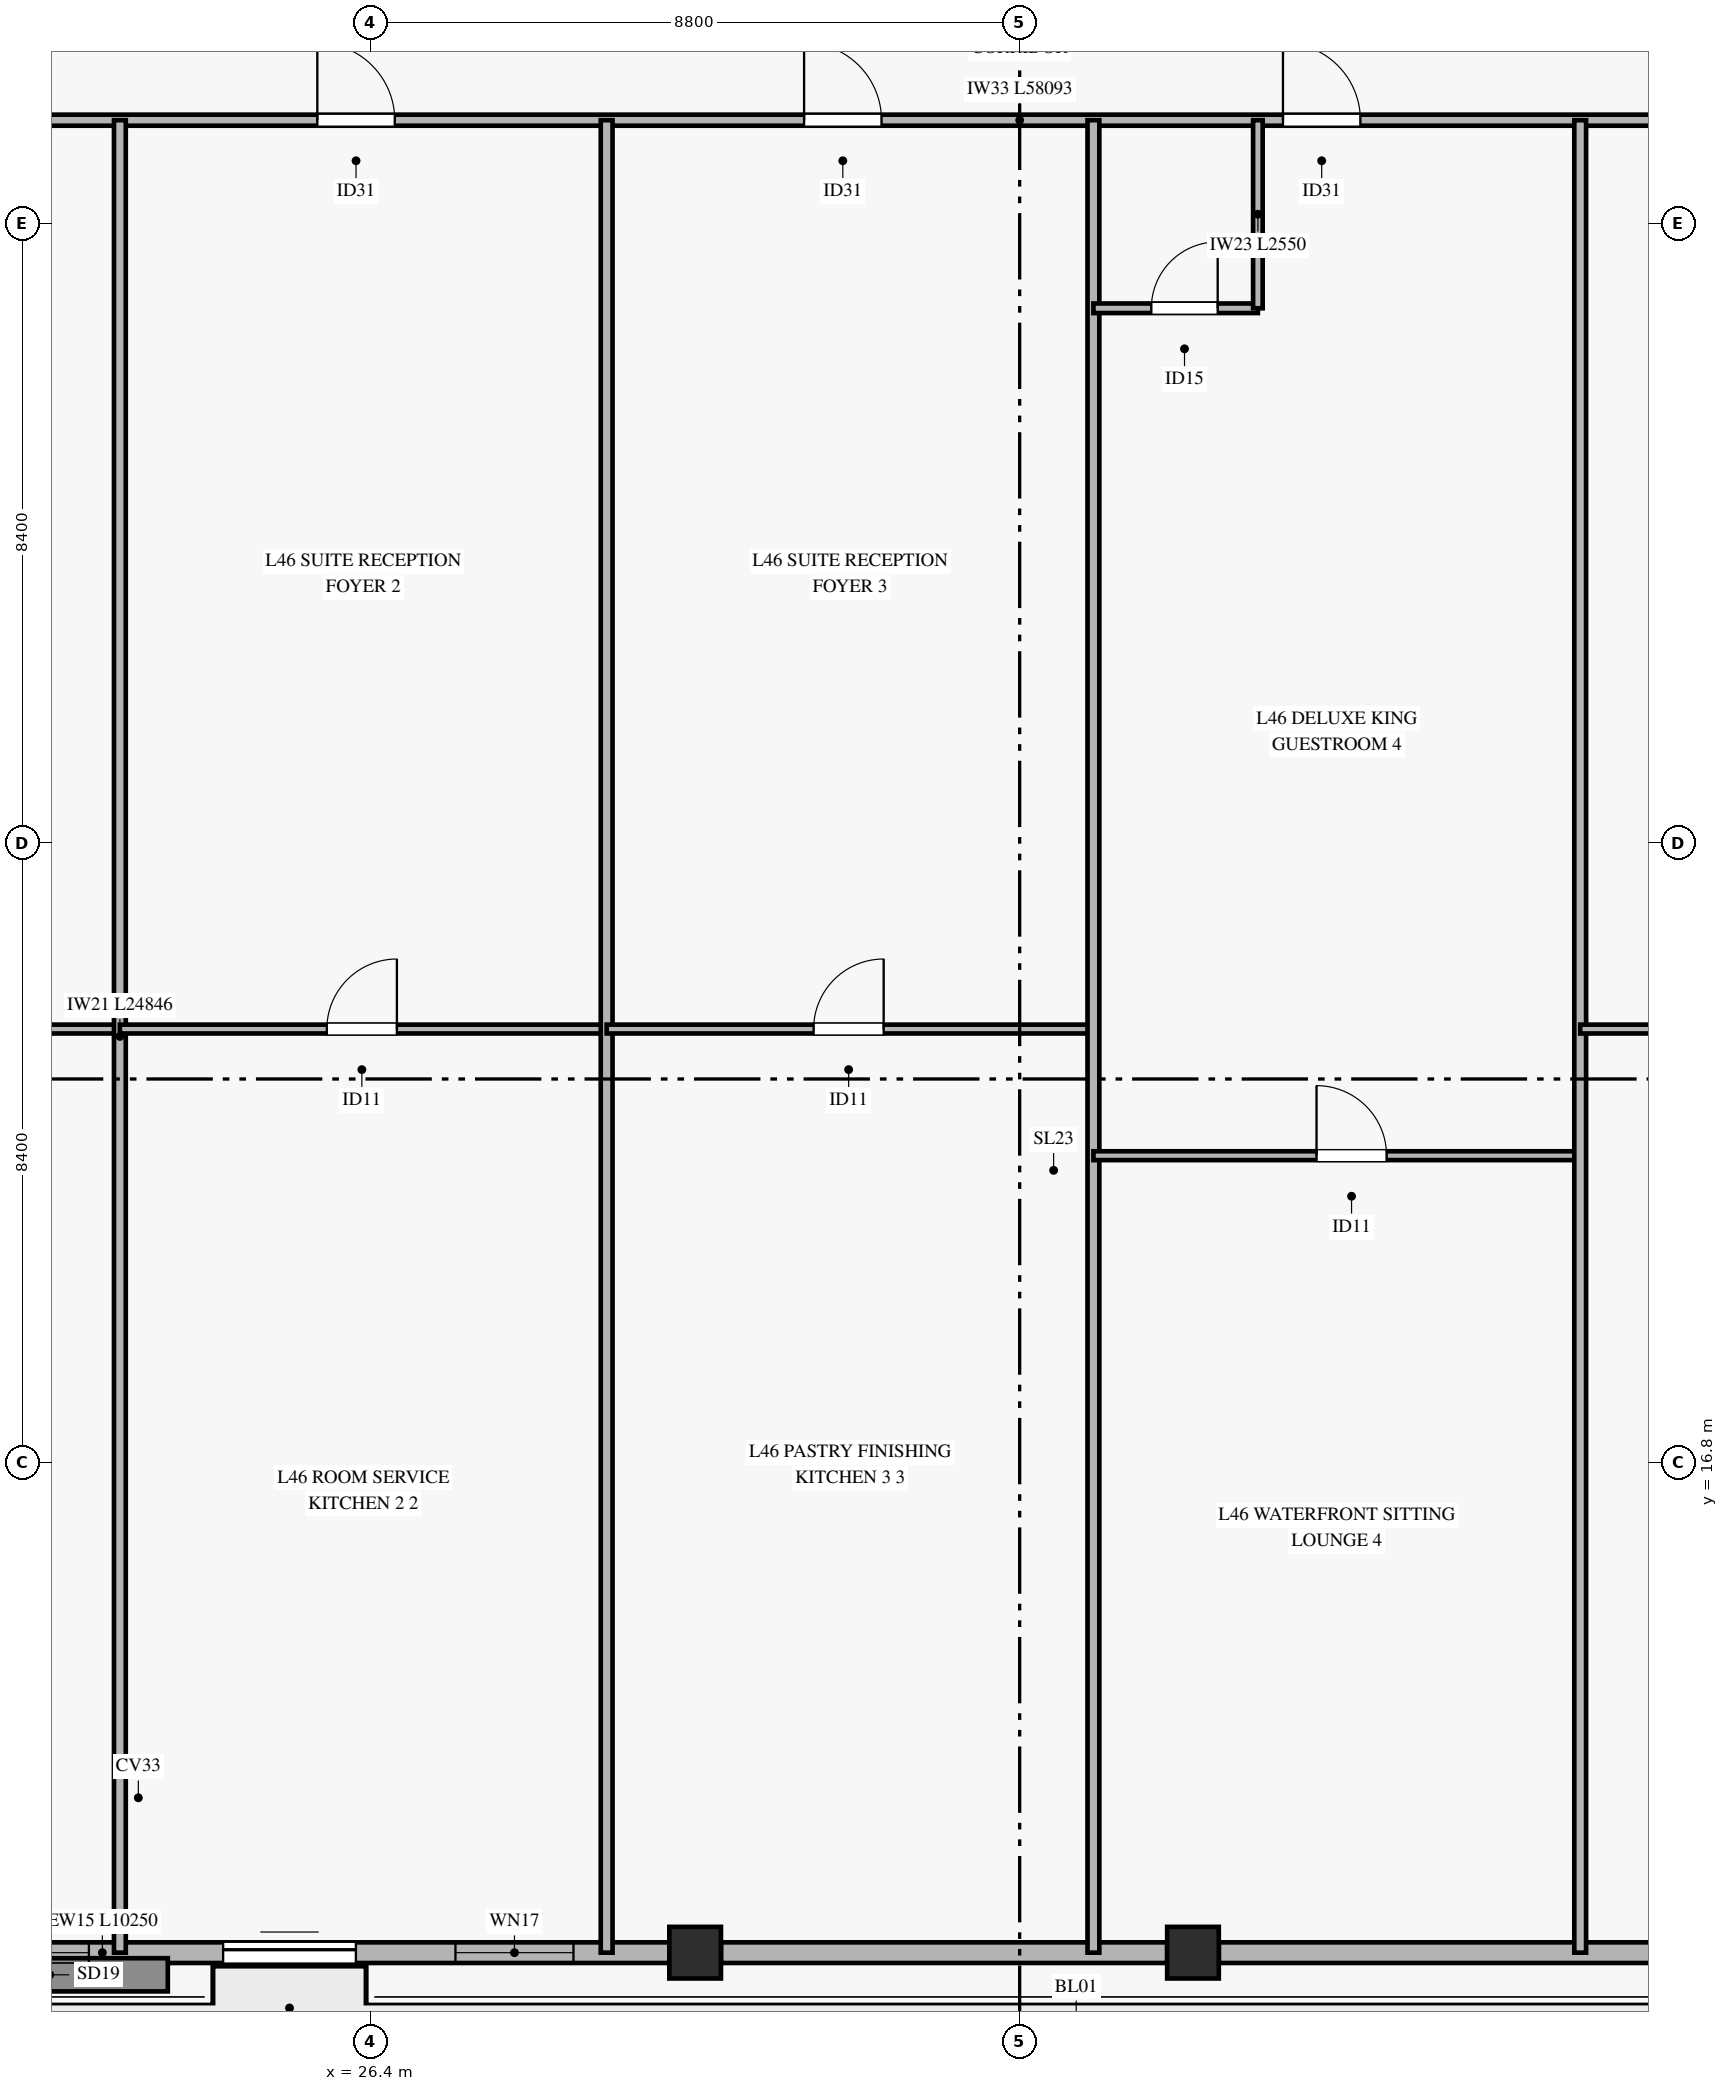
"""IFC4 building model, lengths in metres.
Left out: names, types, materials, properties, quantities, classifications, styles, units other than length and angle.
Written with IfcOpenShell. Run it as: python <this file> out.ifc"""

import sys

from ifc_helpers import new_model, si_unit, direction, frame, frame_2d, origin, origin_2d, place, context, subcontext, project, spatial, rectangle, hollow_rectangle, extrude, source, transform, mapped, element, fill, save


model = new_model("IFC4")
c1 = context("Model", 3, precision=1e-05, world=origin(), true_north=direction((0.0, 1.0)))
c2 = subcontext(c1, "Body", "Model", "MODEL_VIEW")
j1 = project(units=[si_unit("LENGTHUNIT", "METRE"), si_unit("PLANEANGLEUNIT", "RADIAN")], contexts=[c1])
p1 = place(None, origin())
s1 = spatial("IfcSite", under=j1, at=p1, CompositionType="ELEMENT")
p2 = place(p1, origin())
s2 = spatial("IfcBuilding", under=s1, at=p2, CompositionType="ELEMENT")
p3 = place(p2, frame((0.0, 0.0, 184.2)))
s3 = spatial("IfcBuildingStorey", under=s2, at=p3, CompositionType="ELEMENT", Elevation=184.2)
m1 = source(origin(), c2, "Body", "SweptSolid", [
    extrude(hollow_rectangle(XDim=0.7, YDim=0.7, WallThickness=0.032, at=origin_2d()), origin(), (0.0, 0.0, 1.0), 3.27),
])
for number, where, z_axis, x_axis in (
    (1, (30.8, 10.154, 0.0), (0.0, 0.0, 1.0), (1.0, 0.0, 0.0)),
    (2, (37.55, 10.154, 0.0), (0.0, 0.0, 1.0), (1.0, 0.0, 0.0)),
):
    element("IfcColumn", number, at=place(p3, frame(where, z_axis=z_axis, x_axis=x_axis)), inside=s3, PredefinedType="COLUMN", context=c2, shape_type="MappedRepresentation", body=[
        mapped(m1, transform((0.0, 0.0, 0.0), x_axis=(1.0, 0.0, 0.0), y_axis=(0.0, 1.0, 0.0), z_axis=(0.0, 0.0, 1.0), scale=1.0)),
    ])
p4 = place(p3, frame((20.2, 10.154, 0.0), z_axis=(0.0, 0.0, 1.0), x_axis=(1.0, 0.0, 0.0)))
e3 = element("IfcWall", 3, at=p4, inside=s3, PredefinedType="SOLIDWALL", context=c2, shape_type="SweptSolid", body=[
    extrude(rectangle(XDim=10.25, YDim=0.28, at=frame_2d((5.125, 0.0))), origin(), (0.0, 0.0, 1.0), 2.75),
])
p5 = place(p4, frame((4.2, 0.0, 0.0)))
e4 = element("IfcOpeningElement", 4, at=p5, cuts=e3, PredefinedType="OPENING", context=c2, shape_type="SweptSolid", body=[
    extrude(rectangle(XDim=1.8, YDim=2.25, at=frame_2d((0.9, 1.125))), frame((0.0, 0.15, 0.0), z_axis=(0.0, -1.0, 0.0), x_axis=(1.0, 0.0, 0.0)), (0.0, 0.0, 1.0), 0.3),
])
p6 = place(p4, frame((0.38, 0.0, 0.45)))
e5 = element("IfcOpeningElement", 5, at=p6, cuts=e3, PredefinedType="OPENING", context=c2, shape_type="SweptSolid", body=[
    extrude(rectangle(XDim=2.0, YDim=2.0, at=frame_2d((1.0, 1.0))), frame((0.0, 0.15, 0.0), z_axis=(0.0, -1.0, 0.0), x_axis=(1.0, 0.0, 0.0)), (0.0, 0.0, 1.0), 0.3),
])
p7 = place(p4, frame((7.35, 0.0, 0.45)))
e6 = element("IfcOpeningElement", 6, at=p7, cuts=e3, PredefinedType="OPENING", context=c2, shape_type="SweptSolid", body=[
    extrude(rectangle(XDim=1.6, YDim=2.0, at=frame_2d((0.8, 1.0))), frame((0.0, 0.15, 0.0), z_axis=(0.0, -1.0, 0.0), x_axis=(1.0, 0.0, 0.0)), (0.0, 0.0, 1.0), 0.3),
])
for number, where, z_axis, x_axis in (
    (7, (31.15, 10.154, 0.0), (0.0, 0.0, 1.0), (1.0, 0.0, 0.0)),
    (8, (37.9, 10.154, 0.0), (0.0, 0.0, 1.0), (1.0, 0.0, 0.0)),
):
    element("IfcWall", number, at=place(p3, frame(where, z_axis=z_axis, x_axis=x_axis)), inside=s3, PredefinedType="SOLIDWALL", context=c2, shape_type="SweptSolid", body=[
        extrude(rectangle(XDim=6.05, YDim=0.28, at=frame_2d((3.025, 0.0))), origin(), (0.0, 0.0, 1.0), 2.75),
    ])
p8 = place(p3, frame((6.154, 35.0, 0.0), z_axis=(0.0, 0.0, 1.0), x_axis=(1.0, 0.0, 0.0)))
e9 = element("IfcWall", 9, at=p8, inside=s3, PredefinedType="PARTITIONING", context=c2, shape_type="SweptSolid", body=[
    extrude(rectangle(XDim=58.093, YDim=0.15, at=frame_2d((29.046, 0.0))), origin(), (0.0, 0.0, 1.0), 2.455),
])
p9 = place(p8, frame((6.695, 0.0, 0.0)))
e10 = element("IfcOpeningElement", 10, at=p9, cuts=e9, PredefinedType="OPENING", context=c2, shape_type="SweptSolid", body=[
    extrude(rectangle(XDim=1.05, YDim=2.15, at=frame_2d((0.525, 1.075))), frame((0.0, 0.085, 0.0), z_axis=(0.0, -1.0, 0.0), x_axis=(1.0, 0.0, 0.0)), (0.0, 0.0, 1.0), 0.17),
])
p10 = place(p8, frame((19.523, 0.0, 0.0)))
e11 = element("IfcOpeningElement", 11, at=p10, cuts=e9, PredefinedType="OPENING", context=c2, shape_type="SweptSolid", body=[
    extrude(rectangle(XDim=1.05, YDim=2.15, at=frame_2d((0.525, 1.075))), frame((0.0, 0.085, 0.0), z_axis=(0.0, -1.0, 0.0), x_axis=(1.0, 0.0, 0.0)), (0.0, 0.0, 1.0), 0.17),
])
p11 = place(p8, frame((26.123, 0.0, 0.0)))
e12 = element("IfcOpeningElement", 12, at=p11, cuts=e9, PredefinedType="OPENING", context=c2, shape_type="SweptSolid", body=[
    extrude(rectangle(XDim=1.05, YDim=2.15, at=frame_2d((0.525, 1.075))), frame((0.0, 0.085, 0.0), z_axis=(0.0, -1.0, 0.0), x_axis=(1.0, 0.0, 0.0)), (0.0, 0.0, 1.0), 0.17),
])
p12 = place(p8, frame((32.616, 0.0, 0.0)))
e13 = element("IfcOpeningElement", 13, at=p12, cuts=e9, PredefinedType="OPENING", context=c2, shape_type="SweptSolid", body=[
    extrude(rectangle(XDim=1.05, YDim=2.15, at=frame_2d((0.525, 1.075))), frame((0.0, 0.085, 0.0), z_axis=(0.0, -1.0, 0.0), x_axis=(1.0, 0.0, 0.0)), (0.0, 0.0, 1.0), 0.17),
])
p13 = place(p8, frame((44.889, 0.0, 0.0)))
e14 = element("IfcOpeningElement", 14, at=p13, cuts=e9, PredefinedType="OPENING", context=c2, shape_type="SweptSolid", body=[
    extrude(rectangle(XDim=1.05, YDim=2.15, at=frame_2d((0.525, 1.075))), frame((0.0, 0.085, 0.0), z_axis=(0.0, -1.0, 0.0), x_axis=(1.0, 0.0, 0.0)), (0.0, 0.0, 1.0), 0.17),
])
p14 = place(p3, frame((6.154, 22.677, 0.0), z_axis=(0.0, 0.0, 1.0), x_axis=(1.0, 0.0, 0.0)))
e15 = element("IfcWall", 15, at=p14, inside=s3, PredefinedType="PARTITIONING", context=c2, shape_type="SweptSolid", body=[
    extrude(rectangle(XDim=16.846, YDim=0.12, at=frame_2d((8.423, 0.0))), origin(), (0.0, 0.0, 1.0), 2.455),
])
p15 = place(p14, frame((7.024, 0.0, 0.0)))
e16 = element("IfcOpeningElement", 16, at=p15, cuts=e15, PredefinedType="OPENING", context=c2, shape_type="SweptSolid", body=[
    extrude(rectangle(XDim=0.95, YDim=2.1, at=frame_2d((0.475, 1.05))), frame((0.0, 0.07, 0.0), z_axis=(0.0, -1.0, 0.0), x_axis=(1.0, 0.0, 0.0)), (0.0, 0.0, 1.0), 0.14),
])
p16 = place(p3, frame((23.0, 10.154, 0.0), z_axis=(0.0, 0.0, 1.0), x_axis=(0.0, 1.0, 0.0)))
e17 = element("IfcWall", 17, at=p16, inside=s3, PredefinedType="PARTITIONING", context=c2, shape_type="SweptSolid", body=[
    extrude(rectangle(XDim=24.846, YDim=0.16, at=frame_2d((12.423, 0.0))), origin(), (0.0, 0.0, 1.0), 2.755),
])
p17 = place(p3, frame((23.0, 22.677, 0.0), z_axis=(0.0, 0.0, 1.0), x_axis=(1.0, 0.0, 0.0)))
e18 = element("IfcWall", 18, at=p17, inside=s3, PredefinedType="PARTITIONING", context=c2, shape_type="SweptSolid", body=[
    extrude(rectangle(XDim=6.6, YDim=0.12, at=frame_2d((3.3, 0.0))), origin(), (0.0, 0.0, 1.0), 3.27),
])
p18 = place(p17, frame((2.806, 0.0, 0.0)))
e19 = element("IfcOpeningElement", 19, at=p18, cuts=e18, PredefinedType="OPENING", context=c2, shape_type="SweptSolid", body=[
    extrude(rectangle(XDim=0.95, YDim=2.1, at=frame_2d((0.475, 1.05))), frame((0.0, 0.07, 0.0), z_axis=(0.0, -1.0, 0.0), x_axis=(1.0, 0.0, 0.0)), (0.0, 0.0, 1.0), 0.14),
])
p19 = place(p3, frame((29.6, 10.154, 0.0), z_axis=(0.0, 0.0, 1.0), x_axis=(0.0, 1.0, 0.0)))
e20 = element("IfcWall", 20, at=p19, inside=s3, PredefinedType="PARTITIONING", context=c2, shape_type="SweptSolid", body=[
    extrude(rectangle(XDim=24.846, YDim=0.16, at=frame_2d((12.423, 0.0))), origin(), (0.0, 0.0, 1.0), 2.755),
])
p20 = place(p3, frame((29.6, 22.677, 0.0), z_axis=(0.0, 0.0, 1.0), x_axis=(1.0, 0.0, 0.0)))
e21 = element("IfcWall", 21, at=p20, inside=s3, PredefinedType="PARTITIONING", context=c2, shape_type="SweptSolid", body=[
    extrude(rectangle(XDim=6.6, YDim=0.12, at=frame_2d((3.3, 0.0))), origin(), (0.0, 0.0, 1.0), 2.455),
])
p21 = place(p20, frame((2.806, 0.0, 0.0)))
e22 = element("IfcOpeningElement", 22, at=p21, cuts=e21, PredefinedType="OPENING", context=c2, shape_type="SweptSolid", body=[
    extrude(rectangle(XDim=0.95, YDim=2.1, at=frame_2d((0.475, 1.05))), frame((0.0, 0.07, 0.0), z_axis=(0.0, -1.0, 0.0), x_axis=(1.0, 0.0, 0.0)), (0.0, 0.0, 1.0), 0.14),
])
p22 = place(p3, frame((36.2, 10.154, 0.0), z_axis=(0.0, 0.0, 1.0), x_axis=(0.0, 1.0, 0.0)))
e23 = element("IfcWall", 23, at=p22, inside=s3, PredefinedType="PARTITIONING", context=c2, shape_type="SweptSolid", body=[
    extrude(rectangle(XDim=24.846, YDim=0.16, at=frame_2d((12.423, 0.0))), origin(), (0.0, 0.0, 1.0), 2.755),
])
p23 = place(p3, frame((36.2, 32.45, 0.0), z_axis=(0.0, 0.0, 1.0), x_axis=(1.0, 0.0, 0.0)))
e24 = element("IfcWall", 24, at=p23, inside=s3, PredefinedType="PARTITIONING", context=c2, shape_type="SweptSolid", body=[
    extrude(rectangle(XDim=2.23, YDim=0.13, at=frame_2d((1.115, 0.0))), origin(), (0.0, 0.0, 1.0), 2.455),
])
p24 = place(p23, frame((0.785, 0.0, 0.0)))
e25 = element("IfcOpeningElement", 25, at=p24, cuts=e24, PredefinedType="OPENING", context=c2, shape_type="SweptSolid", body=[
    extrude(rectangle(XDim=0.9, YDim=2.1, at=frame_2d((0.45, 1.05))), frame((0.0, 0.075, 0.0), z_axis=(0.0, -1.0, 0.0), x_axis=(1.0, 0.0, 0.0)), (0.0, 0.0, 1.0), 0.15),
])
p25 = place(p3, frame((38.43, 32.45, 0.0), z_axis=(0.0, 0.0, 1.0), x_axis=(0.0, 1.0, 0.0)))
e26 = element("IfcWall", 26, at=p25, inside=s3, PredefinedType="PARTITIONING", context=c2, shape_type="SweptSolid", body=[
    extrude(rectangle(XDim=2.55, YDim=0.13, at=frame_2d((1.275, 0.0))), origin(), (0.0, 0.0, 1.0), 2.805),
])
p26 = place(p3, frame((36.2, 20.96, 0.0), z_axis=(0.0, 0.0, 1.0), x_axis=(1.0, 0.0, 0.0)))
e27 = element("IfcWall", 27, at=p26, inside=s3, PredefinedType="PARTITIONING", context=c2, shape_type="SweptSolid", body=[
    extrude(rectangle(XDim=6.6, YDim=0.12, at=frame_2d((3.3, 0.0))), origin(), (0.0, 0.0, 1.0), 2.455),
])
p27 = place(p26, frame((3.025, 0.0, 0.0)))
e28 = element("IfcOpeningElement", 28, at=p27, cuts=e27, PredefinedType="OPENING", context=c2, shape_type="SweptSolid", body=[
    extrude(rectangle(XDim=0.95, YDim=2.1, at=frame_2d((0.475, 1.05))), frame((0.0, 0.07, 0.0), z_axis=(0.0, -1.0, 0.0), x_axis=(1.0, 0.0, 0.0)), (0.0, 0.0, 1.0), 0.14),
])
p28 = place(p3, frame((42.8, 10.154, 0.0), z_axis=(0.0, 0.0, 1.0), x_axis=(0.0, 1.0, 0.0)))
e29 = element("IfcWall", 29, at=p28, inside=s3, PredefinedType="PARTITIONING", context=c2, shape_type="SweptSolid", body=[
    extrude(rectangle(XDim=24.846, YDim=0.16, at=frame_2d((12.423, 0.0))), origin(), (0.0, 0.0, 1.0), 2.755),
])
p29 = place(p3, frame((42.8, 22.677, 0.0), z_axis=(0.0, 0.0, 1.0), x_axis=(1.0, 0.0, 0.0)))
e30 = element("IfcWall", 30, at=p29, inside=s3, PredefinedType="PARTITIONING", context=c2, shape_type="SweptSolid", body=[
    extrude(rectangle(XDim=21.447, YDim=0.12, at=frame_2d((10.724, 0.0))), origin(), (0.0, 0.0, 1.0), 2.455),
])
p30 = place(p29, frame((8.665, 0.0, 0.0)))
e31 = element("IfcOpeningElement", 31, at=p30, cuts=e30, PredefinedType="OPENING", context=c2, shape_type="SweptSolid", body=[
    extrude(rectangle(XDim=0.95, YDim=2.1, at=frame_2d((0.475, 1.05))), frame((0.0, 0.07, 0.0), z_axis=(0.0, -1.0, 0.0), x_axis=(1.0, 0.0, 0.0)), (0.0, 0.0, 1.0), 0.14),
])
m2 = source(origin(), c2, "Body", "SweptSolid", [
    extrude(rectangle(XDim=1.8, YDim=2.25, at=frame_2d((0.9, 1.125))), frame((0.0, 0.025, 0.0), z_axis=(0.0, -1.0, 0.0), x_axis=(1.0, 0.0, 0.0)), (0.0, 0.0, 1.0), 0.05),
])
p31 = place(p5, origin())
e32 = element("IfcDoor", 32, at=p31, inside=s3, OperationType="SLIDING_TO_LEFT", PredefinedType="DOOR", context=c2, shape_type="MappedRepresentation", body=[
    mapped(m2, transform((0.0, 0.0, 0.0), x_axis=(1.0, 0.0, 0.0), y_axis=(0.0, 1.0, 0.0), z_axis=(0.0, 0.0, 1.0), scale=1.0)),
])
fill(e4, e32)
m3 = source(origin(), c2, "Body", "SweptSolid", [
    extrude(rectangle(XDim=2.0, YDim=2.0, at=frame_2d((1.0, 1.0))), frame((0.0, 0.03, 0.0), z_axis=(0.0, -1.0, 0.0), x_axis=(1.0, 0.0, 0.0)), (0.0, 0.0, 1.0), 0.06),
])
p32 = place(p6, origin())
e33 = element("IfcWindow", 33, at=p32, inside=s3, PartitioningType="SINGLE_PANEL", PredefinedType="WINDOW", context=c2, shape_type="MappedRepresentation", body=[
    mapped(m3, transform((0.0, 0.0, 0.0), x_axis=(1.0, 0.0, 0.0), y_axis=(0.0, 1.0, 0.0), z_axis=(0.0, 0.0, 1.0), scale=1.0)),
])
fill(e5, e33)
m4 = source(origin(), c2, "Body", "SweptSolid", [
    extrude(rectangle(XDim=1.6, YDim=2.0, at=frame_2d((0.8, 1.0))), frame((0.0, 0.03, 0.0), z_axis=(0.0, -1.0, 0.0), x_axis=(1.0, 0.0, 0.0)), (0.0, 0.0, 1.0), 0.06),
])
p33 = place(p7, origin())
e34 = element("IfcWindow", 34, at=p33, inside=s3, PartitioningType="SINGLE_PANEL", PredefinedType="WINDOW", context=c2, shape_type="MappedRepresentation", body=[
    mapped(m4, transform((0.0, 0.0, 0.0), x_axis=(1.0, 0.0, 0.0), y_axis=(0.0, 1.0, 0.0), z_axis=(0.0, 0.0, 1.0), scale=1.0)),
])
fill(e6, e34)
m5 = source(origin(), c2, "Body", "SweptSolid", [
    extrude(rectangle(XDim=1.05, YDim=2.15, at=frame_2d((0.525, 1.075))), frame((0.0, 0.025, 0.0), z_axis=(0.0, -1.0, 0.0), x_axis=(1.0, 0.0, 0.0)), (0.0, 0.0, 1.0), 0.05),
])
p34 = place(p10, origin())
e35 = element("IfcDoor", 35, at=p34, inside=s3, OperationType="SINGLE_SWING_LEFT", PredefinedType="DOOR", context=c2, shape_type="MappedRepresentation", body=[
    mapped(m5, transform((0.0, 0.0, 0.0), x_axis=(1.0, 0.0, 0.0), y_axis=(0.0, 1.0, 0.0), z_axis=(0.0, 0.0, 1.0), scale=1.0)),
])
fill(e11, e35)
m6 = source(origin(), c2, "Body", "SweptSolid", [
    extrude(rectangle(XDim=0.95, YDim=2.1, at=frame_2d((0.475, 1.05))), frame((0.0, 0.025, 0.0), z_axis=(0.0, -1.0, 0.0), x_axis=(1.0, 0.0, 0.0)), (0.0, 0.0, 1.0), 0.05),
])
p35 = place(p18, origin())
e36 = element("IfcDoor", 36, at=p35, inside=s3, OperationType="SINGLE_SWING_RIGHT", PredefinedType="DOOR", context=c2, shape_type="MappedRepresentation", body=[
    mapped(m6, transform((0.0, 0.0, 0.0), x_axis=(1.0, 0.0, 0.0), y_axis=(0.0, 1.0, 0.0), z_axis=(0.0, 0.0, 1.0), scale=1.0)),
])
fill(e19, e36)
p36 = place(p11, origin())
e37 = element("IfcDoor", 37, at=p36, inside=s3, OperationType="SINGLE_SWING_LEFT", PredefinedType="DOOR", context=c2, shape_type="MappedRepresentation", body=[
    mapped(m5, transform((0.0, 0.0, 0.0), x_axis=(1.0, 0.0, 0.0), y_axis=(0.0, 1.0, 0.0), z_axis=(0.0, 0.0, 1.0), scale=1.0)),
])
fill(e12, e37)
p37 = place(p21, origin())
e38 = element("IfcDoor", 38, at=p37, inside=s3, OperationType="SINGLE_SWING_RIGHT", PredefinedType="DOOR", context=c2, shape_type="MappedRepresentation", body=[
    mapped(m6, transform((0.0, 0.0, 0.0), x_axis=(1.0, 0.0, 0.0), y_axis=(0.0, 1.0, 0.0), z_axis=(0.0, 0.0, 1.0), scale=1.0)),
])
fill(e22, e38)
p38 = place(p12, origin())
e39 = element("IfcDoor", 39, at=p38, inside=s3, OperationType="SINGLE_SWING_LEFT", PredefinedType="DOOR", context=c2, shape_type="MappedRepresentation", body=[
    mapped(m5, transform((0.0, 0.0, 0.0), x_axis=(1.0, 0.0, 0.0), y_axis=(0.0, 1.0, 0.0), z_axis=(0.0, 0.0, 1.0), scale=1.0)),
])
fill(e13, e39)
m7 = source(origin(), c2, "Body", "SweptSolid", [
    extrude(rectangle(XDim=0.9, YDim=2.1, at=frame_2d((0.45, 1.05))), frame((0.0, 0.025, 0.0), z_axis=(0.0, -1.0, 0.0), x_axis=(1.0, 0.0, 0.0)), (0.0, 0.0, 1.0), 0.05),
])
p39 = place(p24, origin())
e40 = element("IfcDoor", 40, at=p39, inside=s3, OperationType="SINGLE_SWING_RIGHT", PredefinedType="DOOR", context=c2, shape_type="MappedRepresentation", body=[
    mapped(m7, transform((0.0, 0.0, 0.0), x_axis=(1.0, 0.0, 0.0), y_axis=(0.0, 1.0, 0.0), z_axis=(0.0, 0.0, 1.0), scale=1.0)),
])
fill(e25, e40)
p40 = place(p27, origin())
e41 = element("IfcDoor", 41, at=p40, inside=s3, OperationType="SINGLE_SWING_LEFT", PredefinedType="DOOR", context=c2, shape_type="MappedRepresentation", body=[
    mapped(m6, transform((0.0, 0.0, 0.0), x_axis=(1.0, 0.0, 0.0), y_axis=(0.0, 1.0, 0.0), z_axis=(0.0, 0.0, 1.0), scale=1.0)),
])
fill(e28, e41)
save(model, sys.argv[1])
